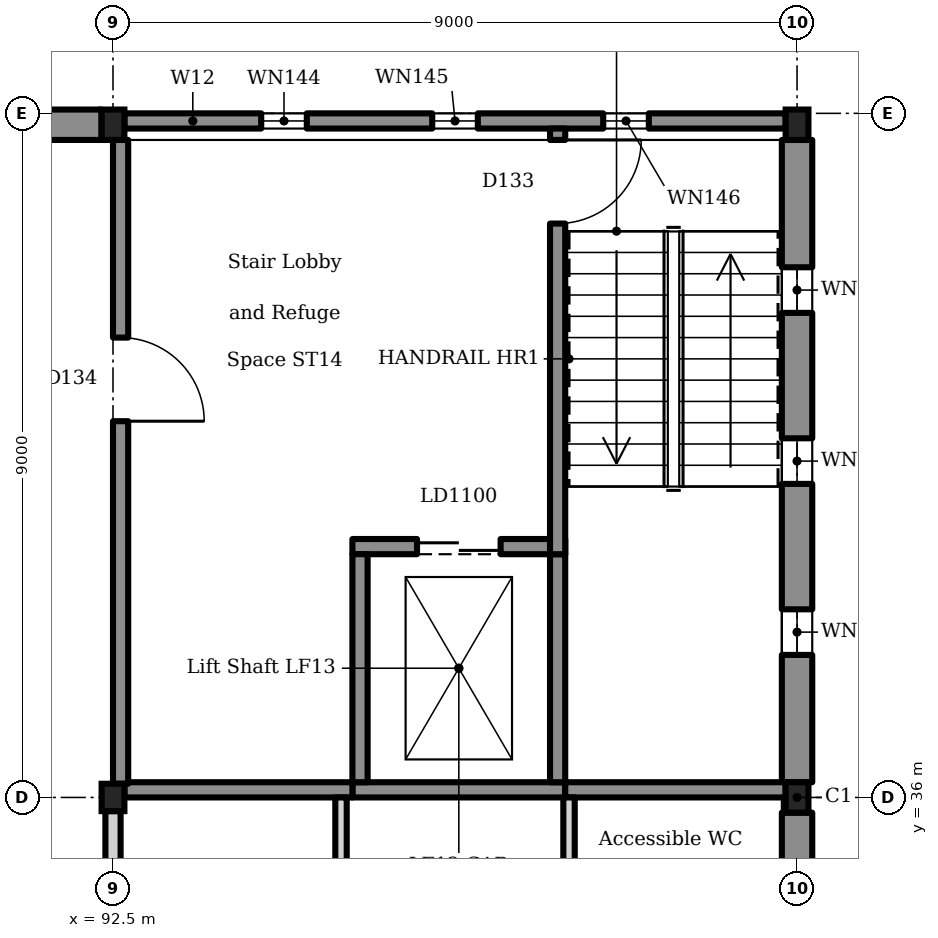
"""IFC4 building model, lengths in metres.
Left out: names, types, materials, properties, quantities, classifications, styles, units other than length and angle.
Written with IfcOpenShell. Run it as: python <this file> out.ifc"""

import sys

from ifc_helpers import new_model, si_unit, direction, frame, frame_2d, origin, origin_2d, place, context, subcontext, project, spatial, rectangle, i_section, extrude, element, fill, save


model = new_model("IFC4")
c1 = context("Model", 3, precision=1e-05, world=origin(), true_north=direction((0.0, 1.0)))
c2 = subcontext(c1, "Body", "Model", "MODEL_VIEW")
j1 = project(units=[si_unit("LENGTHUNIT", "METRE"), si_unit("PLANEANGLEUNIT", "RADIAN")], contexts=[c1])
p1 = place(None, origin())
s1 = spatial("IfcSite", under=j1, at=p1, CompositionType="ELEMENT")
p2 = place(p1, origin())
s2 = spatial("IfcBuilding", under=s1, at=p2, CompositionType="ELEMENT")
p3 = place(p2, frame((0.0, 0.0, 18.9)))
s3 = spatial("IfcBuildingStorey", under=s2, at=p3, CompositionType="ELEMENT", Elevation=18.9)
p4 = place(p3, frame((92.5, 36.0, 0.0), z_axis=(0.0, 0.0, 1.0), x_axis=(1.0, 0.0, 0.0)))
e1 = element("IfcColumn", 1, at=p4, inside=s3, PredefinedType="COLUMN", context=c2, shape_type="SweptSolid", body=[
    extrude(i_section(OverallWidth=0.3, OverallDepth=0.36, WebThickness=0.012, FlangeThickness=0.022, FilletRadius=0.027, at=origin_2d()), origin(), (0.0, 0.0, 1.0), 4.5),
])
for number, where, z_axis, x_axis in (
    (2, (101.5, 36.0, 0.0), (0.0, 0.0, 1.0), (1.0, 0.0, 0.0)),
    (3, (92.5, 44.85, 0.0), (0.0, 0.0, 1.0), (1.0, 0.0, 0.0)),
    (4, (101.5, 44.85, 0.0), (0.0, 0.0, 1.0), (1.0, 0.0, 0.0)),
):
    element("IfcColumn", number, at=place(p3, frame(where, z_axis=z_axis, x_axis=x_axis)), inside=s3, PredefinedType="COLUMN", context=c2, shape_type="SweptSolid", body=[
        extrude(i_section(OverallWidth=0.3, OverallDepth=0.4, WebThickness=0.013, FlangeThickness=0.024, FilletRadius=0.027, at=origin_2d()), origin(), (0.0, 0.0, 1.0), 4.5),
    ])
p5 = place(p3, frame((95.65, 36.1, 0.0), z_axis=(0.0, 0.0, 1.0), x_axis=(1.0, 0.0, 0.0)))
e5 = element("IfcWall", 5, at=p5, inside=s3, PredefinedType="SOLIDWALL", context=c2, shape_type="SweptSolid", body=[
    extrude(rectangle(XDim=2.8, YDim=0.2, at=frame_2d((1.4, 0.0))), origin(), (0.0, 0.0, 1.0), 4.25),
])
p6 = place(p3, frame((95.65, 39.3, 0.0), z_axis=(0.0, 0.0, 1.0), x_axis=(1.0, 0.0, 0.0)))
e6 = element("IfcWall", 6, at=p6, inside=s3, PredefinedType="SOLIDWALL", context=c2, shape_type="SweptSolid", body=[
    extrude(rectangle(XDim=2.8, YDim=0.2, at=frame_2d((1.4, 0.0))), origin(), (0.0, 0.0, 1.0), 4.25),
])
p7 = place(p6, frame((0.85, 0.0, 0.0)))
e7 = element("IfcOpeningElement", 7, at=p7, cuts=e6, PredefinedType="OPENING", context=c2, shape_type="SweptSolid", body=[
    extrude(rectangle(XDim=1.1, YDim=2.1, at=frame_2d((0.55, 1.05))), frame((0.0, 0.11, 0.0), z_axis=(0.0, -1.0, 0.0), x_axis=(1.0, 0.0, 0.0)), (0.0, 0.0, 1.0), 0.22),
])
for number, where, z_axis, x_axis in (
    (8, (95.75, 36.2, 0.0), (0.0, 0.0, 1.0), (0.0, 1.0, 0.0)),
    (9, (98.35, 36.2, 0.0), (0.0, 0.0, 1.0), (0.0, 1.0, 0.0)),
):
    element("IfcWall", number, at=place(p3, frame(where, z_axis=z_axis, x_axis=x_axis)), inside=s3, PredefinedType="SOLIDWALL", context=c2, shape_type="SweptSolid", body=[
        extrude(rectangle(XDim=3.0, YDim=0.2, at=frame_2d((1.5, 0.0))), origin(), (0.0, 0.0, 1.0), 4.25),
    ])
p8 = place(p3, frame((83.65, 44.85, 0.0), z_axis=(0.0, 0.0, 1.0), x_axis=(1.0, 0.0, 0.0)))
e10 = element("IfcWall", 10, at=p8, inside=s3, PredefinedType="SOLIDWALL", context=c2, shape_type="SweptSolid", body=[
    extrude(rectangle(XDim=8.7, YDim=0.4, at=frame_2d((4.35, 0.0))), origin(), (0.0, 0.0, 1.0), 4.5),
])
p9 = place(p8, frame((1.875, 0.0, 0.9)))
e11 = element("IfcOpeningElement", 11, at=p9, cuts=e10, PredefinedType="OPENING", context=c2, shape_type="SweptSolid", body=[
    extrude(rectangle(XDim=0.45, YDim=2.6, at=frame_2d((0.225, 1.3))), frame((0.0, 0.21, 0.0), z_axis=(0.0, -1.0, 0.0), x_axis=(1.0, 0.0, 0.0)), (0.0, 0.0, 1.0), 0.42),
])
p10 = place(p8, frame((4.125, 0.0, 0.9)))
e12 = element("IfcOpeningElement", 12, at=p10, cuts=e10, PredefinedType="OPENING", context=c2, shape_type="SweptSolid", body=[
    extrude(rectangle(XDim=0.45, YDim=2.6, at=frame_2d((0.225, 1.3))), frame((0.0, 0.21, 0.0), z_axis=(0.0, -1.0, 0.0), x_axis=(1.0, 0.0, 0.0)), (0.0, 0.0, 1.0), 0.42),
])
p11 = place(p3, frame((92.65, 44.9, 0.0), z_axis=(0.0, 0.0, 1.0), x_axis=(1.0, 0.0, 0.0)))
e13 = element("IfcWall", 13, at=p11, inside=s3, PredefinedType="SOLIDWALL", context=c2, shape_type="SweptSolid", body=[
    extrude(rectangle(XDim=8.7, YDim=0.2, at=frame_2d((4.35, 0.0))), origin(), (0.0, 0.0, 1.0), 4.5),
])
p12 = place(p11, frame((1.8, 0.0, 0.9)))
e14 = element("IfcOpeningElement", 14, at=p12, cuts=e13, PredefinedType="OPENING", context=c2, shape_type="SweptSolid", body=[
    extrude(rectangle(XDim=0.6, YDim=2.4, at=frame_2d((0.3, 1.2))), frame((0.0, 0.11, 0.0), z_axis=(0.0, -1.0, 0.0), x_axis=(1.0, 0.0, 0.0)), (0.0, 0.0, 1.0), 0.22),
])
p13 = place(p11, frame((4.05, 0.0, 0.9)))
e15 = element("IfcOpeningElement", 15, at=p13, cuts=e13, PredefinedType="OPENING", context=c2, shape_type="SweptSolid", body=[
    extrude(rectangle(XDim=0.6, YDim=2.4, at=frame_2d((0.3, 1.2))), frame((0.0, 0.11, 0.0), z_axis=(0.0, -1.0, 0.0), x_axis=(1.0, 0.0, 0.0)), (0.0, 0.0, 1.0), 0.22),
])
p14 = place(p11, frame((6.3, 0.0, 0.9)))
e16 = element("IfcOpeningElement", 16, at=p14, cuts=e13, PredefinedType="OPENING", context=c2, shape_type="SweptSolid", body=[
    extrude(rectangle(XDim=0.6, YDim=2.4, at=frame_2d((0.3, 1.2))), frame((0.0, 0.11, 0.0), z_axis=(0.0, -1.0, 0.0), x_axis=(1.0, 0.0, 0.0)), (0.0, 0.0, 1.0), 0.22),
])
p15 = place(p3, frame((101.5, 27.2, 0.0), z_axis=(0.0, 0.0, 1.0), x_axis=(0.0, 1.0, 0.0)))
e17 = element("IfcWall", 17, at=p15, inside=s3, PredefinedType="SOLIDWALL", context=c2, shape_type="SweptSolid", body=[
    extrude(rectangle(XDim=8.6, YDim=0.4, at=frame_2d((4.3, 0.0))), origin(), (0.0, 0.0, 1.0), 4.5),
])
p16 = place(p3, frame((101.5, 36.2, 0.0), z_axis=(0.0, 0.0, 1.0), x_axis=(0.0, 1.0, 0.0)))
e18 = element("IfcWall", 18, at=p16, inside=s3, PredefinedType="SOLIDWALL", context=c2, shape_type="SweptSolid", body=[
    extrude(rectangle(XDim=8.45, YDim=0.4, at=frame_2d((4.225, 0.0))), origin(), (0.0, 0.0, 1.0), 4.5),
])
p17 = place(p16, frame((1.675, 0.0, 0.9)))
e19 = element("IfcOpeningElement", 19, at=p17, cuts=e18, PredefinedType="OPENING", context=c2, shape_type="SweptSolid", body=[
    extrude(rectangle(XDim=0.6, YDim=2.4, at=frame_2d((0.3, 1.2))), frame((0.0, 0.21, 0.0), z_axis=(0.0, -1.0, 0.0), x_axis=(1.0, 0.0, 0.0)), (0.0, 0.0, 1.0), 0.42),
])
p18 = place(p16, frame((3.925, 0.0, 0.9)))
e20 = element("IfcOpeningElement", 20, at=p18, cuts=e18, PredefinedType="OPENING", context=c2, shape_type="SweptSolid", body=[
    extrude(rectangle(XDim=0.6, YDim=2.4, at=frame_2d((0.3, 1.2))), frame((0.0, 0.21, 0.0), z_axis=(0.0, -1.0, 0.0), x_axis=(1.0, 0.0, 0.0)), (0.0, 0.0, 1.0), 0.42),
])
p19 = place(p16, frame((6.175, 0.0, 0.9)))
e21 = element("IfcOpeningElement", 21, at=p19, cuts=e18, PredefinedType="OPENING", context=c2, shape_type="SweptSolid", body=[
    extrude(rectangle(XDim=0.6, YDim=2.4, at=frame_2d((0.3, 1.2))), frame((0.0, 0.21, 0.0), z_axis=(0.0, -1.0, 0.0), x_axis=(1.0, 0.0, 0.0)), (0.0, 0.0, 1.0), 0.42),
])
p20 = place(p3, frame((92.65, 36.1, 0.0), z_axis=(0.0, 0.0, 1.0), x_axis=(1.0, 0.0, 0.0)))
e22 = element("IfcWall", 22, at=p20, inside=s3, PredefinedType="SOLIDWALL", context=c2, shape_type="SweptSolid", body=[
    extrude(rectangle(XDim=3.0, YDim=0.2, at=frame_2d((1.5, 0.0))), origin(), (0.0, 0.0, 1.0), 4.25),
])
p21 = place(p3, frame((98.45, 36.1, 0.0), z_axis=(0.0, 0.0, 1.0), x_axis=(1.0, 0.0, 0.0)))
e23 = element("IfcWall", 23, at=p21, inside=s3, PredefinedType="SOLIDWALL", context=c2, shape_type="SweptSolid", body=[
    extrude(rectangle(XDim=2.9, YDim=0.2, at=frame_2d((1.45, 0.0))), origin(), (0.0, 0.0, 1.0), 4.25),
])
p22 = place(p3, frame((92.6, 36.18, 0.0), z_axis=(0.0, 0.0, 1.0), x_axis=(0.0, 1.0, 0.0)))
e24 = element("IfcWall", 24, at=p22, inside=s3, PredefinedType="SOLIDWALL", context=c2, shape_type="SweptSolid", body=[
    extrude(rectangle(XDim=8.47, YDim=0.2, at=frame_2d((4.235, 0.0))), origin(), (0.0, 0.0, 1.0), 4.25),
])
p23 = place(p22, frame((4.77, 0.0, 0.0)))
e25 = element("IfcOpeningElement", 25, at=p23, cuts=e24, PredefinedType="OPENING", context=c2, shape_type="SweptSolid", body=[
    extrude(rectangle(XDim=1.1, YDim=2.1, at=frame_2d((0.55, 1.05))), frame((0.0, 0.11, 0.0), z_axis=(0.0, -1.0, 0.0), x_axis=(1.0, 0.0, 0.0)), (0.0, 0.0, 1.0), 0.22),
])
p24 = place(p3, frame((98.35, 39.2, 0.0), z_axis=(0.0, 0.0, 1.0), x_axis=(0.0, 1.0, 0.0)))
e26 = element("IfcWall", 26, at=p24, inside=s3, PredefinedType="SOLIDWALL", context=c2, shape_type="SweptSolid", body=[
    extrude(rectangle(XDim=5.6, YDim=0.2, at=frame_2d((2.8, 0.0))), origin(), (0.0, 0.0, 1.0), 4.25),
])
p25 = place(p24, frame((4.35, 0.0, 0.0)))
e27 = element("IfcOpeningElement", 27, at=p25, cuts=e26, PredefinedType="OPENING", context=c2, shape_type="SweptSolid", body=[
    extrude(rectangle(XDim=1.1, YDim=2.1, at=frame_2d((0.55, 1.05))), frame((0.0, 0.11, 0.0), z_axis=(0.0, -1.0, 0.0), x_axis=(1.0, 0.0, 0.0)), (0.0, 0.0, 1.0), 0.22),
])
p26 = place(p3, frame((92.5, 33.375, 0.0), z_axis=(0.0, 0.0, 1.0), x_axis=(0.0, 1.0, 0.0)))
e28 = element("IfcWall", 28, at=p26, inside=s3, PredefinedType="SOLIDWALL", context=c2, shape_type="SweptSolid", body=[
    extrude(rectangle(XDim=2.445, YDim=0.2, at=frame_2d((1.223, 0.0))), origin(), (0.0, 0.0, 1.0), 3.6),
])
for number, where, z_axis, x_axis in (
    (29, (95.5, 33.375, 0.0), (0.0, 0.0, 1.0), (0.0, 1.0, 0.0)),
    (30, (98.5, 33.375, 0.0), (0.0, 0.0, 1.0), (0.0, 1.0, 0.0)),
):
    element("IfcWall", number, at=place(p3, frame(where, z_axis=z_axis, x_axis=x_axis)), inside=s3, PredefinedType="PARTITIONING", context=c2, shape_type="SweptSolid", body=[
        extrude(rectangle(XDim=2.625, YDim=0.15, at=frame_2d((1.312, 0.0))), origin(), (0.0, 0.0, 1.0), 3.6),
    ])
p27 = place(p7, origin())
e31 = element("IfcDoor", 31, at=p27, inside=s3, OperationType="SLIDING_TO_LEFT", PredefinedType="DOOR", context=c2, shape_type="SweptSolid", body=[
    extrude(rectangle(XDim=1.1, YDim=2.1, at=frame_2d((0.55, 1.05))), frame((0.0, 0.025, 0.0), z_axis=(0.0, -1.0, 0.0), x_axis=(1.0, 0.0, 0.0)), (0.0, 0.0, 1.0), 0.05),
])
fill(e7, e31)
p28 = place(p12, origin())
e32 = element("IfcWindow", 32, at=p28, inside=s3, PartitioningType="SINGLE_PANEL", PredefinedType="WINDOW", context=c2, shape_type="SweptSolid", body=[
    extrude(rectangle(XDim=0.6, YDim=2.4, at=frame_2d((0.3, 1.2))), frame((0.0, 0.03, 0.0), z_axis=(0.0, -1.0, 0.0), x_axis=(1.0, 0.0, 0.0)), (0.0, 0.0, 1.0), 0.06),
])
fill(e14, e32)
p29 = place(p13, origin())
e33 = element("IfcWindow", 33, at=p29, inside=s3, PartitioningType="SINGLE_PANEL", PredefinedType="WINDOW", context=c2, shape_type="SweptSolid", body=[
    extrude(rectangle(XDim=0.6, YDim=2.4, at=frame_2d((0.3, 1.2))), frame((0.0, 0.03, 0.0), z_axis=(0.0, -1.0, 0.0), x_axis=(1.0, 0.0, 0.0)), (0.0, 0.0, 1.0), 0.06),
])
fill(e15, e33)
p30 = place(p14, origin())
e34 = element("IfcWindow", 34, at=p30, inside=s3, PartitioningType="SINGLE_PANEL", PredefinedType="WINDOW", context=c2, shape_type="SweptSolid", body=[
    extrude(rectangle(XDim=0.6, YDim=2.4, at=frame_2d((0.3, 1.2))), frame((0.0, 0.03, 0.0), z_axis=(0.0, -1.0, 0.0), x_axis=(1.0, 0.0, 0.0)), (0.0, 0.0, 1.0), 0.06),
])
fill(e16, e34)
p31 = place(p17, origin())
e35 = element("IfcWindow", 35, at=p31, inside=s3, PartitioningType="SINGLE_PANEL", PredefinedType="WINDOW", context=c2, shape_type="SweptSolid", body=[
    extrude(rectangle(XDim=0.6, YDim=2.4, at=frame_2d((0.3, 1.2))), frame((0.0, 0.03, 0.0), z_axis=(0.0, -1.0, 0.0), x_axis=(1.0, 0.0, 0.0)), (0.0, 0.0, 1.0), 0.06),
])
fill(e19, e35)
p32 = place(p18, origin())
e36 = element("IfcWindow", 36, at=p32, inside=s3, PartitioningType="SINGLE_PANEL", PredefinedType="WINDOW", context=c2, shape_type="SweptSolid", body=[
    extrude(rectangle(XDim=0.6, YDim=2.4, at=frame_2d((0.3, 1.2))), frame((0.0, 0.03, 0.0), z_axis=(0.0, -1.0, 0.0), x_axis=(1.0, 0.0, 0.0)), (0.0, 0.0, 1.0), 0.06),
])
fill(e20, e36)
p33 = place(p19, origin())
e37 = element("IfcWindow", 37, at=p33, inside=s3, PartitioningType="SINGLE_PANEL", PredefinedType="WINDOW", context=c2, shape_type="SweptSolid", body=[
    extrude(rectangle(XDim=0.6, YDim=2.4, at=frame_2d((0.3, 1.2))), frame((0.0, 0.03, 0.0), z_axis=(0.0, -1.0, 0.0), x_axis=(1.0, 0.0, 0.0)), (0.0, 0.0, 1.0), 0.06),
])
fill(e21, e37)
p34 = place(p25, frame((1.1, 0.0, 0.0), z_axis=(0.0, 0.0, 1.0), x_axis=(-1.0, 0.0, 0.0)))
e38 = element("IfcDoor", 38, at=p34, inside=s3, OperationType="SINGLE_SWING_RIGHT", PredefinedType="DOOR", context=c2, shape_type="SweptSolid", body=[
    extrude(rectangle(XDim=1.1, YDim=2.1, at=frame_2d((0.55, 1.05))), frame((0.0, 0.025, 0.0), z_axis=(0.0, -1.0, 0.0), x_axis=(1.0, 0.0, 0.0)), (0.0, 0.0, 1.0), 0.05),
])
fill(e27, e38)
p35 = place(p23, frame((1.1, 0.0, 0.0), z_axis=(0.0, 0.0, 1.0), x_axis=(-1.0, 0.0, 0.0)))
e39 = element("IfcDoor", 39, at=p35, inside=s3, OperationType="SINGLE_SWING_LEFT", PredefinedType="DOOR", context=c2, shape_type="SweptSolid", body=[
    extrude(rectangle(XDim=1.1, YDim=2.1, at=frame_2d((0.55, 1.05))), frame((0.0, 0.025, 0.0), z_axis=(0.0, -1.0, 0.0), x_axis=(1.0, 0.0, 0.0)), (0.0, 0.0, 1.0), 0.05),
])
fill(e25, e39)
save(model, sys.argv[1])
